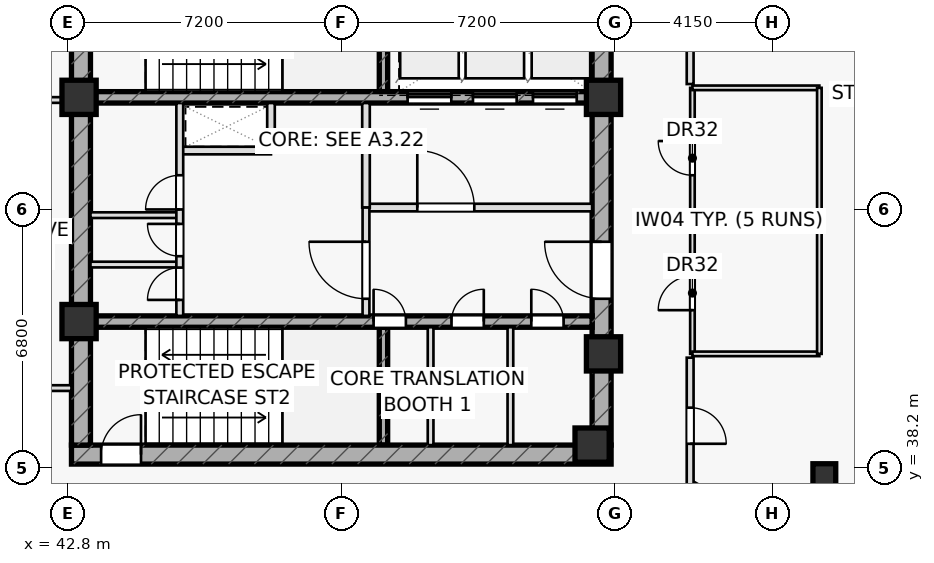
"""IFC4 building model, lengths in metres.
Left out: names, types, materials, properties, quantities, classifications, styles, units other than length and angle.
Written with IfcOpenShell. Run it as: python <this file> out.ifc"""

import sys

from ifc_helpers import new_model, si_unit, direction, frame, frame_2d, origin, origin_2d, place, context, subcontext, project, spatial, rectangle, hollow_rectangle, extrude, element, fill, save


model = new_model("IFC4")
c1 = context("Model", 3, precision=1e-05, world=origin(), true_north=direction((0.0, 1.0)))
c2 = subcontext(c1, "Body", "Model", "MODEL_VIEW")
j1 = project(units=[si_unit("LENGTHUNIT", "METRE"), si_unit("PLANEANGLEUNIT", "RADIAN")], contexts=[c1])
p1 = place(None, origin())
s1 = spatial("IfcSite", under=j1, at=p1, CompositionType="ELEMENT")
p2 = place(p1, origin())
s2 = spatial("IfcBuilding", under=s1, at=p2, CompositionType="ELEMENT")
p3 = place(p2, frame((0.0, 0.0, 241.9)))
s3 = spatial("IfcBuildingStorey", under=s2, at=p3, CompositionType="ELEMENT", Elevation=241.9)
for number, where, z_axis, x_axis in (
    (1, (51.11, 48.1, 0.0), (0.0, 0.0, 1.0), (0.0, 1.0, 0.0)),
    (2, (51.11, 38.8, 0.0), (0.0, 0.0, 1.0), (0.0, 1.0, 0.0)),
):
    element("IfcWall", number, at=place(p3, frame(where, z_axis=z_axis, x_axis=x_axis)), inside=s3, PredefinedType="SHEAR", context=c2, shape_type="SweptSolid", body=[
        extrude(rectangle(XDim=3.1, YDim=0.22, at=frame_2d((1.55, 0.0))), origin(), (0.0, 0.0, 1.0), 3.65),
    ])
p4 = place(p3, frame((42.9, 38.55, 0.0), z_axis=(0.0, 0.0, 1.0), x_axis=(1.0, 0.0, 0.0)))
e3 = element("IfcWall", 3, at=p4, inside=s3, PredefinedType="SHEAR", context=c2, shape_type="SweptSolid", body=[
    extrude(rectangle(XDim=14.2, YDim=0.5, at=frame_2d((7.1, 0.0))), origin(), (0.0, 0.0, 1.0), 3.65),
])
p5 = place(p4, frame((0.78, 0.0, 0.0)))
e4 = element("IfcOpeningElement", 4, at=p5, cuts=e3, PredefinedType="OPENING", context=c2, shape_type="SweptSolid", body=[
    extrude(rectangle(XDim=1.05, YDim=2.2, at=frame_2d((0.525, 1.1))), frame((0.0, 0.26, 0.0), z_axis=(0.0, -1.0, 0.0), x_axis=(1.0, 0.0, 0.0)), (0.0, 0.0, 1.0), 0.52),
])
p6 = place(p3, frame((43.15, 38.8, 0.0), z_axis=(0.0, 0.0, 1.0), x_axis=(0.0, 1.0, 0.0)))
e5 = element("IfcWall", 5, at=p6, inside=s3, PredefinedType="SHEAR", context=c2, shape_type="SweptSolid", body=[
    extrude(rectangle(XDim=12.4, YDim=0.5, at=frame_2d((6.2, 0.0))), origin(), (0.0, 0.0, 1.0), 3.65),
])
p7 = place(p3, frame((56.85, 38.8, 0.0), z_axis=(0.0, 0.0, 1.0), x_axis=(0.0, 1.0, 0.0)))
e6 = element("IfcWall", 6, at=p7, inside=s3, PredefinedType="SHEAR", context=c2, shape_type="SweptSolid", body=[
    extrude(rectangle(XDim=12.4, YDim=0.5, at=frame_2d((6.2, 0.0))), origin(), (0.0, 0.0, 1.0), 3.65),
])
p8 = place(p7, frame((3.85, 0.0, 0.0)))
e7 = element("IfcOpeningElement", 7, at=p8, cuts=e6, PredefinedType="OPENING", context=c2, shape_type="SweptSolid", body=[
    extrude(rectangle(XDim=1.5, YDim=2.2, at=frame_2d((0.75, 1.1))), frame((0.0, 0.26, 0.0), z_axis=(0.0, -1.0, 0.0), x_axis=(1.0, 0.0, 0.0)), (0.0, 0.0, 1.0), 0.52),
])
p9 = place(p3, frame((43.4, 47.95, 0.0), z_axis=(0.0, 0.0, 1.0), x_axis=(1.0, 0.0, 0.0)))
e8 = element("IfcWall", 8, at=p9, inside=s3, PredefinedType="SHEAR", context=c2, shape_type="SweptSolid", body=[
    extrude(rectangle(XDim=13.2, YDim=0.3, at=frame_2d((6.6, 0.0))), origin(), (0.0, 0.0, 1.0), 3.65),
])
p10 = place(p9, frame((8.345, 0.0, 0.0)))
e9 = element("IfcOpeningElement", 9, at=p10, cuts=e8, PredefinedType="OPENING", context=c2, shape_type="SweptSolid", body=[
    extrude(rectangle(XDim=1.15, YDim=2.2, at=frame_2d((0.575, 1.1))), frame((0.0, 0.16, 0.0), z_axis=(0.0, -1.0, 0.0), x_axis=(1.0, 0.0, 0.0)), (0.0, 0.0, 1.0), 0.32),
])
p11 = place(p9, frame((10.065, 0.0, 0.0)))
e10 = element("IfcOpeningElement", 10, at=p11, cuts=e8, PredefinedType="OPENING", context=c2, shape_type="SweptSolid", body=[
    extrude(rectangle(XDim=1.15, YDim=2.2, at=frame_2d((0.575, 1.1))), frame((0.0, 0.16, 0.0), z_axis=(0.0, -1.0, 0.0), x_axis=(1.0, 0.0, 0.0)), (0.0, 0.0, 1.0), 0.32),
])
p12 = place(p9, frame((11.645, 0.0, 0.0)))
e11 = element("IfcOpeningElement", 11, at=p12, cuts=e8, PredefinedType="OPENING", context=c2, shape_type="SweptSolid", body=[
    extrude(rectangle(XDim=1.15, YDim=2.2, at=frame_2d((0.575, 1.1))), frame((0.0, 0.16, 0.0), z_axis=(0.0, -1.0, 0.0), x_axis=(1.0, 0.0, 0.0)), (0.0, 0.0, 1.0), 0.32),
])
p13 = place(p3, frame((43.4, 42.05, 0.0), z_axis=(0.0, 0.0, 1.0), x_axis=(1.0, 0.0, 0.0)))
e12 = element("IfcWall", 12, at=p13, inside=s3, PredefinedType="SHEAR", context=c2, shape_type="SweptSolid", body=[
    extrude(rectangle(XDim=13.2, YDim=0.3, at=frame_2d((6.6, 0.0))), origin(), (0.0, 0.0, 1.0), 3.65),
])
p14 = place(p13, frame((7.45, 0.0, 0.0)))
e13 = element("IfcOpeningElement", 13, at=p14, cuts=e12, PredefinedType="OPENING", context=c2, shape_type="SweptSolid", body=[
    extrude(rectangle(XDim=0.85, YDim=2.05, at=frame_2d((0.425, 1.025))), frame((0.0, 0.16, 0.0), z_axis=(0.0, -1.0, 0.0), x_axis=(1.0, 0.0, 0.0)), (0.0, 0.0, 1.0), 0.32),
])
p15 = place(p13, frame((9.5, 0.0, 0.0)))
e14 = element("IfcOpeningElement", 14, at=p15, cuts=e12, PredefinedType="OPENING", context=c2, shape_type="SweptSolid", body=[
    extrude(rectangle(XDim=0.85, YDim=2.05, at=frame_2d((0.425, 1.025))), frame((0.0, 0.16, 0.0), z_axis=(0.0, -1.0, 0.0), x_axis=(1.0, 0.0, 0.0)), (0.0, 0.0, 1.0), 0.32),
])
p16 = place(p13, frame((11.6, 0.0, 0.0)))
e15 = element("IfcOpeningElement", 15, at=p16, cuts=e12, PredefinedType="OPENING", context=c2, shape_type="SweptSolid", body=[
    extrude(rectangle(XDim=0.85, YDim=2.05, at=frame_2d((0.425, 1.025))), frame((0.0, 0.16, 0.0), z_axis=(0.0, -1.0, 0.0), x_axis=(1.0, 0.0, 0.0)), (0.0, 0.0, 1.0), 0.32),
])
for number, where, z_axis, x_axis in (
    (16, (43.1, 47.95, 0.0), (0.0, 0.0, 1.0), (1.0, 0.0, 0.0)),
    (17, (56.9, 47.95, 0.0), (0.0, 0.0, 1.0), (1.0, 0.0, 0.0)),
    (18, (43.1, 42.05, 0.0), (0.0, 0.0, 1.0), (1.0, 0.0, 0.0)),
    (19, (56.9, 41.2, 0.0), (0.0, 0.0, 1.0), (1.0, 0.0, 0.0)),
    (20, (56.6, 38.8, 0.0), (0.0, 0.0, 1.0), (1.0, 0.0, 0.0)),
):
    element("IfcColumn", number, at=place(p3, frame(where, z_axis=z_axis, x_axis=x_axis)), inside=s3, PredefinedType="COLUMN", context=c2, shape_type="SweptSolid", body=[
        extrude(rectangle(XDim=0.9, YDim=0.9, at=origin_2d()), origin(), (0.0, 0.0, 1.0), 3.65),
    ])
p17 = place(p3, frame((62.711, 38.009, 0.0), z_axis=(0.0, 0.0, 1.0), x_axis=(1.0, 0.0, 0.0)))
e21 = element("IfcColumn", 21, at=p17, inside=s3, PredefinedType="COLUMN", context=c2, shape_type="SweptSolid", body=[
    extrude(hollow_rectangle(XDim=0.6, YDim=0.6, WallThickness=0.036, at=origin_2d()), origin(), (0.0, 0.0, 1.0), 3.65),
])
p18 = place(p3, frame((45.75, 46.55, 0.0), z_axis=(0.0, 0.0, 1.0), x_axis=(1.0, 0.0, 0.0)))
e22 = element("IfcWall", 22, at=p18, inside=s3, PredefinedType="PARTITIONING", context=c2, shape_type="SweptSolid", body=[
    extrude(rectangle(XDim=2.4, YDim=0.2, at=frame_2d((1.2, 0.0))), origin(), (0.0, 0.0, 1.0), 3.65),
])
p19 = place(p3, frame((48.15, 46.55, 0.0), z_axis=(0.0, 0.0, 1.0), x_axis=(0.0, 1.0, 0.0)))
e23 = element("IfcWall", 23, at=p19, inside=s3, PredefinedType="PARTITIONING", context=c2, shape_type="SweptSolid", body=[
    extrude(rectangle(XDim=1.25, YDim=0.2, at=frame_2d((0.625, 0.0))), origin(), (0.0, 0.0, 1.0), 3.65),
])
p20 = place(p3, frame((50.65, 45.05, 0.0), z_axis=(0.0, 0.0, 1.0), x_axis=(1.0, 0.0, 0.0)))
e24 = element("IfcWall", 24, at=p20, inside=s3, PredefinedType="PARTITIONING", context=c2, shape_type="SweptSolid", body=[
    extrude(rectangle(XDim=5.95, YDim=0.2, at=frame_2d((2.975, 0.0))), origin(), (0.0, 0.0, 1.0), 3.65),
])
p21 = place(p20, frame((1.35, 0.0, 0.0)))
e25 = element("IfcOpeningElement", 25, at=p21, cuts=e24, PredefinedType="OPENING", context=c2, shape_type="SweptSolid", body=[
    extrude(rectangle(XDim=1.5, YDim=2.2, at=frame_2d((0.75, 1.1))), frame((0.0, 0.11, 0.0), z_axis=(0.0, -1.0, 0.0), x_axis=(1.0, 0.0, 0.0)), (0.0, 0.0, 1.0), 0.22),
])
p22 = place(p3, frame((50.65, 45.05, 0.0), z_axis=(0.0, 0.0, 1.0), x_axis=(0.0, 1.0, 0.0)))
e26 = element("IfcWall", 26, at=p22, inside=s3, PredefinedType="PARTITIONING", context=c2, shape_type="SweptSolid", body=[
    extrude(rectangle(XDim=2.75, YDim=0.2, at=frame_2d((1.375, 0.0))), origin(), (0.0, 0.0, 1.0), 3.65),
])
p23 = place(p3, frame((50.65, 42.2, 0.0), z_axis=(0.0, 0.0, 1.0), x_axis=(0.0, 1.0, 0.0)))
e27 = element("IfcWall", 27, at=p23, inside=s3, PredefinedType="PARTITIONING", context=c2, shape_type="SweptSolid", body=[
    extrude(rectangle(XDim=2.85, YDim=0.18, at=frame_2d((1.425, 0.0))), origin(), (0.0, 0.0, 1.0), 3.65),
])
p24 = place(p23, frame((0.45, 0.0, 0.0)))
e28 = element("IfcOpeningElement", 28, at=p24, cuts=e27, PredefinedType="OPENING", context=c2, shape_type="SweptSolid", body=[
    extrude(rectangle(XDim=1.5, YDim=2.2, at=frame_2d((0.75, 1.1))), frame((0.0, 0.1, 0.0), z_axis=(0.0, -1.0, 0.0), x_axis=(1.0, 0.0, 0.0)), (0.0, 0.0, 1.0), 0.2),
])
for number, where, z_axis, x_axis in (
    (29, (52.35, 38.8, 0.0), (0.0, 0.0, 1.0), (0.0, 1.0, 0.0)),
    (30, (54.45, 38.8, 0.0), (0.0, 0.0, 1.0), (0.0, 1.0, 0.0)),
):
    element("IfcWall", number, at=place(p3, frame(where, z_axis=z_axis, x_axis=x_axis)), inside=s3, PredefinedType="PARTITIONING", context=c2, shape_type="SweptSolid", body=[
        extrude(rectangle(XDim=3.1, YDim=0.15, at=frame_2d((1.55, 0.0))), origin(), (0.0, 0.0, 1.0), 3.65),
    ])
for number, where, z_axis, x_axis in (
    (31, (43.4, 43.55, 0.0), (0.0, 0.0, 1.0), (1.0, 0.0, 0.0)),
    (32, (43.4, 44.85, 0.0), (0.0, 0.0, 1.0), (1.0, 0.0, 0.0)),
):
    element("IfcWall", number, at=place(p3, frame(where, z_axis=z_axis, x_axis=x_axis)), inside=s3, PredefinedType="PARTITIONING", context=c2, shape_type="SweptSolid", body=[
        extrude(rectangle(XDim=2.35, YDim=0.15, at=frame_2d((1.175, 0.0))), origin(), (0.0, 0.0, 1.0), 3.65),
    ])
p25 = place(p3, frame((45.75, 42.2, 0.0), z_axis=(0.0, 0.0, 1.0), x_axis=(0.0, 1.0, 0.0)))
e33 = element("IfcWall", 33, at=p25, inside=s3, PredefinedType="PARTITIONING", context=c2, shape_type="SweptSolid", body=[
    extrude(rectangle(XDim=5.6, YDim=0.18, at=frame_2d((2.8, 0.0))), origin(), (0.0, 0.0, 1.0), 3.65),
])
p26 = place(p25, frame((0.42, 0.0, 0.0)))
e34 = element("IfcOpeningElement", 34, at=p26, cuts=e33, PredefinedType="OPENING", context=c2, shape_type="SweptSolid", body=[
    extrude(rectangle(XDim=0.85, YDim=2.05, at=frame_2d((0.425, 1.025))), frame((0.0, 0.1, 0.0), z_axis=(0.0, -1.0, 0.0), x_axis=(1.0, 0.0, 0.0)), (0.0, 0.0, 1.0), 0.2),
])
p27 = place(p25, frame((1.57, 0.0, 0.0)))
e35 = element("IfcOpeningElement", 35, at=p27, cuts=e33, PredefinedType="OPENING", context=c2, shape_type="SweptSolid", body=[
    extrude(rectangle(XDim=0.85, YDim=2.05, at=frame_2d((0.425, 1.025))), frame((0.0, 0.1, 0.0), z_axis=(0.0, -1.0, 0.0), x_axis=(1.0, 0.0, 0.0)), (0.0, 0.0, 1.0), 0.2),
])
p28 = place(p25, frame((2.8, 0.0, 0.0)))
e36 = element("IfcOpeningElement", 36, at=p28, cuts=e33, PredefinedType="OPENING", context=c2, shape_type="SweptSolid", body=[
    extrude(rectangle(XDim=0.9, YDim=2.05, at=frame_2d((0.45, 1.025))), frame((0.0, 0.1, 0.0), z_axis=(0.0, -1.0, 0.0), x_axis=(1.0, 0.0, 0.0)), (0.0, 0.0, 1.0), 0.2),
])
p29 = place(p3, frame((37.14, 40.3, 0.0), z_axis=(0.0, 0.0, 1.0), x_axis=(1.0, 0.0, 0.0)))
e37 = element("IfcWall", 37, at=p29, inside=s3, PredefinedType="PARTITIONING", context=c2, shape_type="SweptSolid", body=[
    extrude(rectangle(XDim=5.76, YDim=0.15, at=frame_2d((2.88, 0.0))), origin(), (0.0, 0.0, 1.0), 3.025),
])
p30 = place(p29, frame((3.21, 0.0, 0.0)))
e38 = element("IfcOpeningElement", 38, at=p30, cuts=e37, PredefinedType="OPENING", context=c2, shape_type="SweptSolid", body=[
    extrude(rectangle(XDim=0.95, YDim=2.05, at=frame_2d((0.475, 1.025))), frame((0.0, 0.085, 0.0), z_axis=(0.0, -1.0, 0.0), x_axis=(1.0, 0.0, 0.0)), (0.0, 0.0, 1.0), 0.17),
])
p31 = place(p3, frame((37.14, 47.88, 0.0), z_axis=(0.0, 0.0, 1.0), x_axis=(1.0, 0.0, 0.0)))
e39 = element("IfcWall", 39, at=p31, inside=s3, PredefinedType="PARTITIONING", context=c2, shape_type="SweptSolid", body=[
    extrude(rectangle(XDim=5.76, YDim=0.15, at=frame_2d((2.88, 0.0))), origin(), (0.0, 0.0, 1.0), 3.025),
])
p32 = place(p3, frame((59.24, 41.2, 0.0), z_axis=(0.0, 0.0, 1.0), x_axis=(0.0, 1.0, 0.0)))
e40 = element("IfcWall", 40, at=p32, inside=s3, PredefinedType="PARTITIONING", context=c2, shape_type="SweptSolid", body=[
    extrude(rectangle(XDim=7.0, YDim=0.12, at=frame_2d((3.5, 0.0))), origin(), (0.0, 0.0, 1.0), 3.65),
])
p33 = place(p32, frame((1.15, 0.0, 0.0)))
e41 = element("IfcOpeningElement", 41, at=p33, cuts=e40, PredefinedType="OPENING", context=c2, shape_type="SweptSolid", body=[
    extrude(rectangle(XDim=0.9, YDim=2.05, at=frame_2d((0.45, 1.025))), frame((0.0, 0.07, 0.0), z_axis=(0.0, -1.0, 0.0), x_axis=(1.0, 0.0, 0.0)), (0.0, 0.0, 1.0), 0.14),
])
p34 = place(p32, frame((4.7, 0.0, 0.0)))
e42 = element("IfcOpeningElement", 42, at=p34, cuts=e40, PredefinedType="OPENING", context=c2, shape_type="SweptSolid", body=[
    extrude(rectangle(XDim=0.9, YDim=2.05, at=frame_2d((0.45, 1.025))), frame((0.0, 0.07, 0.0), z_axis=(0.0, -1.0, 0.0), x_axis=(1.0, 0.0, 0.0)), (0.0, 0.0, 1.0), 0.14),
])
p35 = place(p3, frame((59.24, 41.2, 0.0), z_axis=(0.0, 0.0, 1.0), x_axis=(1.0, 0.0, 0.0)))
e43 = element("IfcWall", 43, at=p35, inside=s3, PredefinedType="PARTITIONING", context=c2, shape_type="SweptSolid", body=[
    extrude(rectangle(XDim=3.34, YDim=0.12, at=frame_2d((1.67, 0.0))), origin(), (0.0, 0.0, 1.0), 3.025),
])
for number, where, z_axis, x_axis in (
    (44, (59.24, 44.65, 0.0), (0.0, 0.0, 1.0), (1.0, 0.0, 0.0)),
    (45, (59.24, 48.2, 0.0), (0.0, 0.0, 1.0), (1.0, 0.0, 0.0)),
):
    element("IfcWall", number, at=place(p3, frame(where, z_axis=z_axis, x_axis=x_axis)), inside=s3, PredefinedType="PARTITIONING", context=c2, shape_type="SweptSolid", body=[
        extrude(rectangle(XDim=3.34, YDim=0.12, at=frame_2d((1.67, 0.0))), origin(), (0.0, 0.0, 1.0), 3.65),
    ])
p36 = place(p3, frame((62.58, 41.2, 0.0), z_axis=(0.0, 0.0, 1.0), x_axis=(0.0, 1.0, 0.0)))
e46 = element("IfcWall", 46, at=p36, inside=s3, PredefinedType="PARTITIONING", context=c2, shape_type="SweptSolid", body=[
    extrude(rectangle(XDim=7.0, YDim=0.12, at=frame_2d((3.5, 0.0))), origin(), (0.0, 0.0, 1.0), 3.325),
])
p37 = place(p3, frame((59.18, 37.804, 0.0), z_axis=(0.0, 0.0, 1.0), x_axis=(0.871373014064, -0.490621106721, 0.0)))
e47 = element("IfcWall", 47, at=p37, inside=s3, PredefinedType="PARTITIONING", context=c2, shape_type="SweptSolid", body=[
    extrude(rectangle(XDim=4.96, YDim=0.15, at=frame_2d((2.48, 0.0))), origin(), (0.0, 0.0, 1.0), 3.135),
])
p38 = place(p3, frame((59.18, 53.83, 0.0), z_axis=(0.0, 0.0, 1.0), x_axis=(0.0, -1.0, 0.0)))
e48 = element("IfcWall", 48, at=p38, inside=s3, PredefinedType="PARTITIONING", context=c2, shape_type="SweptSolid", body=[
    extrude(rectangle(XDim=5.53, YDim=0.18, at=frame_2d((2.765, 0.0))), origin(), (0.0, 0.0, 1.0), 3.65),
])
p39 = place(p3, frame((59.18, 41.1, 0.0), z_axis=(0.0, 0.0, 1.0), x_axis=(0.0, -1.0, 0.0)))
e49 = element("IfcWall", 49, at=p39, inside=s3, PredefinedType="PARTITIONING", context=c2, shape_type="SweptSolid", body=[
    extrude(rectangle(XDim=4.93, YDim=0.18, at=frame_2d((2.465, 0.0))), origin(), (0.0, 0.0, 1.0), 3.325),
])
p40 = place(p39, frame((1.316, 0.0, 0.0)))
e50 = element("IfcOpeningElement", 50, at=p40, cuts=e49, PredefinedType="OPENING", context=c2, shape_type="SweptSolid", body=[
    extrude(rectangle(XDim=0.95, YDim=2.05, at=frame_2d((0.475, 1.025))), frame((0.0, 0.1, 0.0), z_axis=(0.0, -1.0, 0.0), x_axis=(1.0, 0.0, 0.0)), (0.0, 0.0, 1.0), 0.2),
])
p41 = place(p5, origin())
e51 = element("IfcDoor", 51, at=p41, inside=s3, OperationType="SINGLE_SWING_RIGHT", PredefinedType="DOOR", context=c2, shape_type="SweptSolid", body=[
    extrude(rectangle(XDim=1.05, YDim=2.2, at=frame_2d((0.525, 1.1))), frame((0.0, 0.025, 0.0), z_axis=(0.0, -1.0, 0.0), x_axis=(1.0, 0.0, 0.0)), (0.0, 0.0, 1.0), 0.05),
])
fill(e4, e51)
p42 = place(p8, origin())
e52 = element("IfcDoor", 52, at=p42, inside=s3, OperationType="SINGLE_SWING_RIGHT", PredefinedType="DOOR", context=c2, shape_type="SweptSolid", body=[
    extrude(rectangle(XDim=1.5, YDim=2.2, at=frame_2d((0.75, 1.1))), frame((0.0, 0.025, 0.0), z_axis=(0.0, -1.0, 0.0), x_axis=(1.0, 0.0, 0.0)), (0.0, 0.0, 1.0), 0.05),
])
fill(e7, e52)
p43 = place(p21, origin())
e53 = element("IfcDoor", 53, at=p43, inside=s3, OperationType="SINGLE_SWING_LEFT", PredefinedType="DOOR", context=c2, shape_type="SweptSolid", body=[
    extrude(rectangle(XDim=1.5, YDim=2.2, at=frame_2d((0.75, 1.1))), frame((0.0, 0.025, 0.0), z_axis=(0.0, -1.0, 0.0), x_axis=(1.0, 0.0, 0.0)), (0.0, 0.0, 1.0), 0.05),
])
fill(e25, e53)
p44 = place(p24, origin())
e54 = element("IfcDoor", 54, at=p44, inside=s3, OperationType="SINGLE_SWING_RIGHT", PredefinedType="DOOR", context=c2, shape_type="SweptSolid", body=[
    extrude(rectangle(XDim=1.5, YDim=2.2, at=frame_2d((0.75, 1.1))), frame((0.0, 0.025, 0.0), z_axis=(0.0, -1.0, 0.0), x_axis=(1.0, 0.0, 0.0)), (0.0, 0.0, 1.0), 0.05),
])
fill(e28, e54)
p45 = place(p14, origin())
e55 = element("IfcDoor", 55, at=p45, inside=s3, OperationType="SINGLE_SWING_LEFT", PredefinedType="DOOR", context=c2, shape_type="SweptSolid", body=[
    extrude(rectangle(XDim=0.85, YDim=2.05, at=frame_2d((0.425, 1.025))), frame((0.0, 0.025, 0.0), z_axis=(0.0, -1.0, 0.0), x_axis=(1.0, 0.0, 0.0)), (0.0, 0.0, 1.0), 0.05),
])
fill(e13, e55)
p46 = place(p15, origin())
e56 = element("IfcDoor", 56, at=p46, inside=s3, OperationType="SINGLE_SWING_RIGHT", PredefinedType="DOOR", context=c2, shape_type="SweptSolid", body=[
    extrude(rectangle(XDim=0.85, YDim=2.05, at=frame_2d((0.425, 1.025))), frame((0.0, 0.025, 0.0), z_axis=(0.0, -1.0, 0.0), x_axis=(1.0, 0.0, 0.0)), (0.0, 0.0, 1.0), 0.05),
])
fill(e14, e56)
p47 = place(p16, origin())
e57 = element("IfcDoor", 57, at=p47, inside=s3, OperationType="SINGLE_SWING_LEFT", PredefinedType="DOOR", context=c2, shape_type="SweptSolid", body=[
    extrude(rectangle(XDim=0.85, YDim=2.05, at=frame_2d((0.425, 1.025))), frame((0.0, 0.025, 0.0), z_axis=(0.0, -1.0, 0.0), x_axis=(1.0, 0.0, 0.0)), (0.0, 0.0, 1.0), 0.05),
])
fill(e15, e57)
p48 = place(p26, origin())
e58 = element("IfcDoor", 58, at=p48, inside=s3, OperationType="SINGLE_SWING_LEFT", PredefinedType="DOOR", context=c2, shape_type="SweptSolid", body=[
    extrude(rectangle(XDim=0.85, YDim=2.05, at=frame_2d((0.425, 1.025))), frame((0.0, 0.025, 0.0), z_axis=(0.0, -1.0, 0.0), x_axis=(1.0, 0.0, 0.0)), (0.0, 0.0, 1.0), 0.05),
])
fill(e34, e58)
p49 = place(p27, origin())
e59 = element("IfcDoor", 59, at=p49, inside=s3, OperationType="SINGLE_SWING_RIGHT", PredefinedType="DOOR", context=c2, shape_type="SweptSolid", body=[
    extrude(rectangle(XDim=0.85, YDim=2.05, at=frame_2d((0.425, 1.025))), frame((0.0, 0.025, 0.0), z_axis=(0.0, -1.0, 0.0), x_axis=(1.0, 0.0, 0.0)), (0.0, 0.0, 1.0), 0.05),
])
fill(e35, e59)
p50 = place(p28, origin())
e60 = element("IfcDoor", 60, at=p50, inside=s3, OperationType="SINGLE_SWING_LEFT", PredefinedType="DOOR", context=c2, shape_type="SweptSolid", body=[
    extrude(rectangle(XDim=0.9, YDim=2.05, at=frame_2d((0.45, 1.025))), frame((0.0, 0.025, 0.0), z_axis=(0.0, -1.0, 0.0), x_axis=(1.0, 0.0, 0.0)), (0.0, 0.0, 1.0), 0.05),
])
fill(e36, e60)
p51 = place(p33, origin())
e61 = element("IfcDoor", 61, at=p51, inside=s3, OperationType="SINGLE_SWING_LEFT", PredefinedType="DOOR", context=c2, shape_type="SweptSolid", body=[
    extrude(rectangle(XDim=0.9, YDim=2.05, at=frame_2d((0.45, 1.025))), frame((0.0, 0.025, 0.0), z_axis=(0.0, -1.0, 0.0), x_axis=(1.0, 0.0, 0.0)), (0.0, 0.0, 1.0), 0.05),
])
fill(e41, e61)
p52 = place(p34, origin())
e62 = element("IfcDoor", 62, at=p52, inside=s3, OperationType="SINGLE_SWING_RIGHT", PredefinedType="DOOR", context=c2, shape_type="SweptSolid", body=[
    extrude(rectangle(XDim=0.9, YDim=2.05, at=frame_2d((0.45, 1.025))), frame((0.0, 0.025, 0.0), z_axis=(0.0, -1.0, 0.0), x_axis=(1.0, 0.0, 0.0)), (0.0, 0.0, 1.0), 0.05),
])
fill(e42, e62)
p53 = place(p40, origin())
e63 = element("IfcDoor", 63, at=p53, inside=s3, OperationType="SINGLE_SWING_RIGHT", PredefinedType="DOOR", context=c2, shape_type="SweptSolid", body=[
    extrude(rectangle(XDim=0.95, YDim=2.05, at=frame_2d((0.475, 1.025))), frame((0.0, 0.025, 0.0), z_axis=(0.0, -1.0, 0.0), x_axis=(1.0, 0.0, 0.0)), (0.0, 0.0, 1.0), 0.05),
])
fill(e50, e63)
p54 = place(p10, origin())
e64 = element("IfcDoor", 64, at=p54, inside=s3, OperationType="SLIDING_TO_LEFT", PredefinedType="DOOR", context=c2, shape_type="SweptSolid", body=[
    extrude(rectangle(XDim=1.15, YDim=2.2, at=frame_2d((0.575, 1.1))), frame((0.0, 0.025, 0.0), z_axis=(0.0, -1.0, 0.0), x_axis=(1.0, 0.0, 0.0)), (0.0, 0.0, 1.0), 0.05),
])
fill(e9, e64)
p55 = place(p11, origin())
e65 = element("IfcDoor", 65, at=p55, inside=s3, OperationType="SLIDING_TO_LEFT", PredefinedType="DOOR", context=c2, shape_type="SweptSolid", body=[
    extrude(rectangle(XDim=1.15, YDim=2.2, at=frame_2d((0.575, 1.1))), frame((0.0, 0.025, 0.0), z_axis=(0.0, -1.0, 0.0), x_axis=(1.0, 0.0, 0.0)), (0.0, 0.0, 1.0), 0.05),
])
fill(e10, e65)
p56 = place(p12, origin())
e66 = element("IfcDoor", 66, at=p56, inside=s3, OperationType="SLIDING_TO_LEFT", PredefinedType="DOOR", context=c2, shape_type="SweptSolid", body=[
    extrude(rectangle(XDim=1.15, YDim=2.2, at=frame_2d((0.575, 1.1))), frame((0.0, 0.025, 0.0), z_axis=(0.0, -1.0, 0.0), x_axis=(1.0, 0.0, 0.0)), (0.0, 0.0, 1.0), 0.05),
])
fill(e11, e66)
save(model, sys.argv[1])
